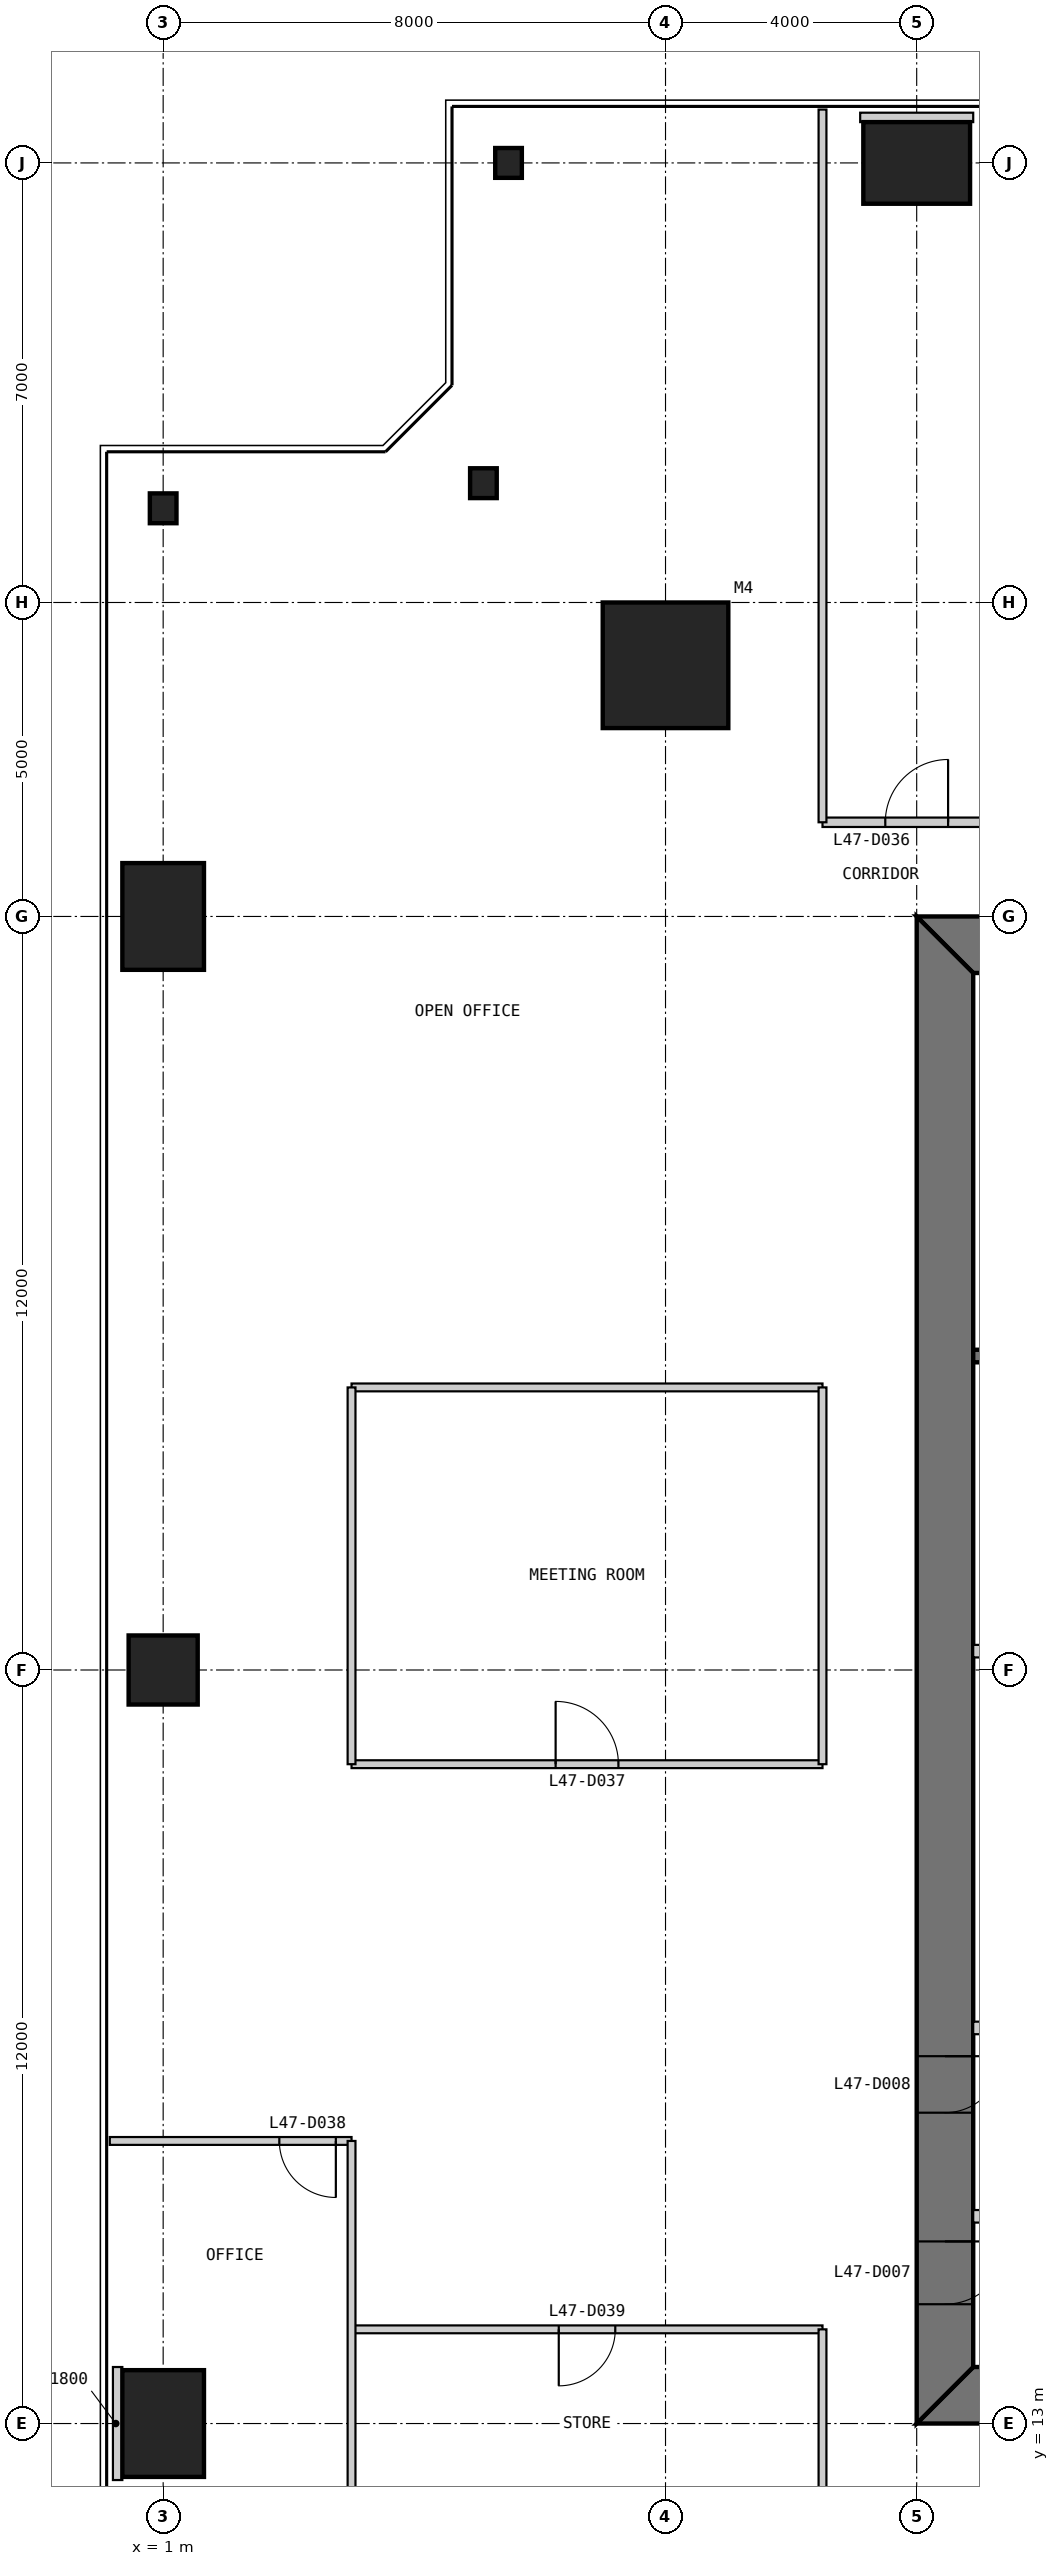
"""IFC4 building model, lengths in metres.
Left out: names, types, materials, properties, quantities, classifications, styles, units other than length and angle.
Written with IfcOpenShell. Run it as: python <this file> out.ifc"""

import sys

from ifc_helpers import new_model, si_unit, direction, frame, frame_2d, origin, origin_2d, place, context, subcontext, project, spatial, polyline, rectangle, i_section, outline, extrude, element, fill, save


model = new_model("IFC4")
c1 = context("Model", 3, precision=1e-05, world=origin(), true_north=direction((0.0, 1.0)))
c2 = subcontext(c1, "Body", "Model", "MODEL_VIEW")
j1 = project(units=[si_unit("LENGTHUNIT", "METRE"), si_unit("PLANEANGLEUNIT", "RADIAN")], contexts=[c1])
p1 = place(None, origin())
s1 = spatial("IfcSite", under=j1, at=p1, CompositionType="ELEMENT")
p2 = place(p1, origin())
s2 = spatial("IfcBuilding", under=s1, at=p2, CompositionType="ELEMENT")
p3 = place(p2, frame((0.0, 0.0, 201.8)))
s3 = spatial("IfcBuildingStorey", under=s2, at=p3, CompositionType="ELEMENT", Elevation=201.8)
p4 = place(p3, frame((9.0, 41.0, 0.0), z_axis=(0.0, 0.0, 1.0), x_axis=(1.0, 0.0, 0.0)))
e1 = element("IfcColumn", 1, at=p4, inside=s3, PredefinedType="COLUMN", context=c2, shape_type="SweptSolid", body=[
    extrude(rectangle(XDim=2.0, YDim=2.0, at=origin_2d()), origin(), (0.0, 0.0, 1.0), 4.0),
])
p5 = place(p3, frame((13.0, 49.0, 0.0), z_axis=(0.0, 0.0, 1.0), x_axis=(1.0, 0.0, 0.0)))
e2 = element("IfcColumn", 2, at=p5, inside=s3, PredefinedType="COLUMN", context=c2, shape_type="SweptSolid", body=[
    extrude(rectangle(XDim=1.7, YDim=1.3, at=origin_2d()), origin(), (0.0, 0.0, 1.0), 4.0),
])
for number, where, z_axis, x_axis in (
    (3, (6.5, 49.0, 0.0), (0.0, 0.0, 1.0), (1.0, 0.0, 0.0)),
    (4, (6.1, 43.9, 0.0), (0.0, 0.0, 1.0), (1.0, 0.0, 0.0)),
    (5, (1.0, 43.5, 0.0), (0.0, 0.0, 1.0), (1.0, 0.0, 0.0)),
):
    element("IfcColumn", number, at=place(p3, frame(where, z_axis=z_axis, x_axis=x_axis)), inside=s3, PredefinedType="COLUMN", context=c2, shape_type="SweptSolid", body=[
        extrude(i_section(OverallWidth=0.424, OverallDepth=0.475, WebThickness=0.048, FlangeThickness=0.077, at=origin_2d()), origin(), (0.0, 0.0, 1.0), 4.0),
    ])
p6 = place(p3, frame((1.0, 37.0, 0.0), z_axis=(0.0, 0.0, 1.0), x_axis=(1.0, 0.0, 0.0)))
e6 = element("IfcColumn", 6, at=p6, inside=s3, PredefinedType="COLUMN", context=c2, shape_type="SweptSolid", body=[
    extrude(rectangle(XDim=1.3, YDim=1.7, at=origin_2d()), origin(), (0.0, 0.0, 1.0), 4.0),
])
p7 = place(p3, frame((1.0, 25.0, 0.0), z_axis=(0.0, 0.0, 1.0), x_axis=(1.0, 0.0, 0.0)))
e7 = element("IfcColumn", 7, at=p7, inside=s3, PredefinedType="COLUMN", context=c2, shape_type="SweptSolid", body=[
    extrude(rectangle(XDim=1.1, YDim=1.1, at=origin_2d()), origin(), (0.0, 0.0, 1.0), 4.0),
])
p8 = place(p3, frame((1.0, 13.0, 0.0), z_axis=(0.0, 0.0, 1.0), x_axis=(1.0, 0.0, 0.0)))
e8 = element("IfcColumn", 8, at=p8, inside=s3, PredefinedType="COLUMN", context=c2, shape_type="SweptSolid", body=[
    extrude(rectangle(XDim=1.3, YDim=1.7, at=origin_2d()), origin(), (0.0, 0.0, 1.0), 4.0),
])
p9 = place(p3, frame((13.0, 13.45, 0.0), z_axis=(0.0, 0.0, 1.0), x_axis=(1.0, 0.0, 0.0)))
e9 = element("IfcWall", 9, at=p9, inside=s3, PredefinedType="SHEAR", context=c2, shape_type="SweptSolid", body=[
    extrude(outline(polyline([(0.0, -0.45), (24.0, -0.45), (23.1, 0.45), (0.9, 0.45), (0.0, -0.45)])), origin(), (0.0, 0.0, 1.0), 4.0),
])
p10 = place(p9, frame((4.9, 0.0, 0.0)))
e10 = element("IfcOpeningElement", 10, at=p10, cuts=e9, PredefinedType="OPENING", context=c2, shape_type="SweptSolid", body=[
    extrude(rectangle(XDim=1.0, YDim=2.2, at=frame_2d((0.5, 1.1))), frame((0.0, 0.46, 0.0), z_axis=(0.0, -1.0, 0.0), x_axis=(1.0, 0.0, 0.0)), (0.0, 0.0, 1.0), 0.92),
])
p11 = place(p9, frame((8.9, 0.0, 0.0)))
e11 = element("IfcOpeningElement", 11, at=p11, cuts=e9, PredefinedType="OPENING", context=c2, shape_type="SweptSolid", body=[
    extrude(rectangle(XDim=1.1, YDim=2.2, at=frame_2d((0.55, 1.1))), frame((0.0, 0.46, 0.0), z_axis=(0.0, -1.0, 0.0), x_axis=(1.0, 0.0, 0.0)), (0.0, 0.0, 1.0), 0.92),
])
p12 = place(p9, frame((15.05, 0.0, 0.0)))
e12 = element("IfcOpeningElement", 12, at=p12, cuts=e9, PredefinedType="OPENING", context=c2, shape_type="SweptSolid", body=[
    extrude(rectangle(XDim=0.9, YDim=2.2, at=frame_2d((0.45, 1.1))), frame((0.0, 0.46, 0.0), z_axis=(0.0, -1.0, 0.0), x_axis=(1.0, 0.0, 0.0)), (0.0, 0.0, 1.0), 0.92),
])
p13 = place(p9, frame((17.9, 0.0, 0.0)))
e13 = element("IfcOpeningElement", 13, at=p13, cuts=e9, PredefinedType="OPENING", context=c2, shape_type="SweptSolid", body=[
    extrude(rectangle(XDim=1.0, YDim=2.2, at=frame_2d((0.5, 1.1))), frame((0.0, 0.46, 0.0), z_axis=(0.0, -1.0, 0.0), x_axis=(1.0, 0.0, 0.0)), (0.0, 0.0, 1.0), 0.92),
])
p14 = place(p9, frame((21.4, 0.0, 0.0)))
e14 = element("IfcOpeningElement", 14, at=p14, cuts=e9, PredefinedType="OPENING", context=c2, shape_type="SweptSolid", body=[
    extrude(rectangle(XDim=1.0, YDim=2.2, at=frame_2d((0.5, 1.1))), frame((0.0, 0.46, 0.0), z_axis=(0.0, -1.0, 0.0), x_axis=(1.0, 0.0, 0.0)), (0.0, 0.0, 1.0), 0.92),
])
p15 = place(p3, frame((37.0, 36.55, 0.0), z_axis=(0.0, 0.0, 1.0), x_axis=(-1.0, 0.0, 0.0)))
e15 = element("IfcWall", 15, at=p15, inside=s3, PredefinedType="SHEAR", context=c2, shape_type="SweptSolid", body=[
    extrude(outline(polyline([(0.0, -0.45), (24.0, -0.45), (23.1, 0.45), (0.9, 0.45), (0.0, -0.45)])), origin(), (0.0, 0.0, 1.0), 4.0),
])
p16 = place(p15, frame((4.9, 0.0, 0.0)))
e16 = element("IfcOpeningElement", 16, at=p16, cuts=e15, PredefinedType="OPENING", context=c2, shape_type="SweptSolid", body=[
    extrude(rectangle(XDim=1.0, YDim=2.2, at=frame_2d((0.5, 1.1))), frame((0.0, 0.46, 0.0), z_axis=(0.0, -1.0, 0.0), x_axis=(1.0, 0.0, 0.0)), (0.0, 0.0, 1.0), 0.92),
])
p17 = place(p15, frame((8.9, 0.0, 0.0)))
e17 = element("IfcOpeningElement", 17, at=p17, cuts=e15, PredefinedType="OPENING", context=c2, shape_type="SweptSolid", body=[
    extrude(rectangle(XDim=1.1, YDim=2.2, at=frame_2d((0.55, 1.1))), frame((0.0, 0.46, 0.0), z_axis=(0.0, -1.0, 0.0), x_axis=(1.0, 0.0, 0.0)), (0.0, 0.0, 1.0), 0.92),
])
p18 = place(p15, frame((15.05, 0.0, 0.0)))
e18 = element("IfcOpeningElement", 18, at=p18, cuts=e15, PredefinedType="OPENING", context=c2, shape_type="SweptSolid", body=[
    extrude(rectangle(XDim=0.9, YDim=2.2, at=frame_2d((0.45, 1.1))), frame((0.0, 0.46, 0.0), z_axis=(0.0, -1.0, 0.0), x_axis=(1.0, 0.0, 0.0)), (0.0, 0.0, 1.0), 0.92),
])
p19 = place(p15, frame((17.9, 0.0, 0.0)))
e19 = element("IfcOpeningElement", 19, at=p19, cuts=e15, PredefinedType="OPENING", context=c2, shape_type="SweptSolid", body=[
    extrude(rectangle(XDim=1.0, YDim=2.2, at=frame_2d((0.5, 1.1))), frame((0.0, 0.46, 0.0), z_axis=(0.0, -1.0, 0.0), x_axis=(1.0, 0.0, 0.0)), (0.0, 0.0, 1.0), 0.92),
])
p20 = place(p15, frame((21.4, 0.0, 0.0)))
e20 = element("IfcOpeningElement", 20, at=p20, cuts=e15, PredefinedType="OPENING", context=c2, shape_type="SweptSolid", body=[
    extrude(rectangle(XDim=1.0, YDim=2.2, at=frame_2d((0.5, 1.1))), frame((0.0, 0.46, 0.0), z_axis=(0.0, -1.0, 0.0), x_axis=(1.0, 0.0, 0.0)), (0.0, 0.0, 1.0), 0.92),
])
p21 = place(p3, frame((13.45, 36.1, 0.0), z_axis=(0.0, 0.0, 1.0), x_axis=(0.0, -1.0, 0.0)))
e21 = element("IfcWall", 21, at=p21, inside=s3, PredefinedType="SHEAR", context=c2, shape_type="SweptSolid", body=[
    extrude(outline(polyline([(-0.9, -0.45), (23.1, -0.45), (22.2, 0.45), (0.0, 0.45), (-0.9, -0.45)])), origin(), (0.0, 0.0, 1.0), 4.0),
])
p22 = place(p21, frame((20.2, 0.0, 0.0)))
e22 = element("IfcOpeningElement", 22, at=p22, cuts=e21, PredefinedType="OPENING", context=c2, shape_type="SweptSolid", body=[
    extrude(rectangle(XDim=1.0, YDim=2.2, at=frame_2d((0.5, 1.1))), frame((0.0, 0.46, 0.0), z_axis=(0.0, -1.0, 0.0), x_axis=(1.0, 0.0, 0.0)), (0.0, 0.0, 1.0), 0.92),
])
p23 = place(p21, frame((17.25, 0.0, 0.0)))
e23 = element("IfcOpeningElement", 23, at=p23, cuts=e21, PredefinedType="OPENING", context=c2, shape_type="SweptSolid", body=[
    extrude(rectangle(XDim=0.9, YDim=2.2, at=frame_2d((0.45, 1.1))), frame((0.0, 0.46, 0.0), z_axis=(0.0, -1.0, 0.0), x_axis=(1.0, 0.0, 0.0)), (0.0, 0.0, 1.0), 0.92),
])
for number, where, z_axis, x_axis in (
    (24, (13.9, 16.3, 0.0), (0.0, 0.0, 1.0), (1.0, 0.0, 0.0)),
    (25, (13.9, 19.3, 0.0), (0.0, 0.0, 1.0), (1.0, 0.0, 0.0)),
    (26, (13.9, 25.3, 0.0), (0.0, 0.0, 1.0), (1.0, 0.0, 0.0)),
):
    element("IfcWall", number, at=place(p3, frame(where, z_axis=z_axis, x_axis=x_axis)), inside=s3, PredefinedType="PARTITIONING", context=c2, shape_type="SweptSolid", body=[
        extrude(rectangle(XDim=2.8, YDim=0.2, at=frame_2d((1.4, 0.0))), origin(), (0.0, 0.0, 1.0), 3.8),
    ])
p24 = place(p3, frame((29.7, 30.0, 0.0), z_axis=(0.0, 0.0, 1.0), x_axis=(-1.0, 0.0, 0.0)))
e27 = element("IfcWall", 27, at=p24, inside=s3, PredefinedType="SOLIDWALL", context=c2, shape_type="SweptSolid", body=[
    extrude(rectangle(XDim=15.8, YDim=0.2, at=frame_2d((7.9, 0.0))), origin(), (0.0, 0.0, 1.0), 3.8),
])
p25 = place(p3, frame((38.5, 38.5, 0.0), z_axis=(0.0, 0.0, 1.0), x_axis=(-1.0, 0.0, 0.0)))
e28 = element("IfcWall", 28, at=p25, inside=s3, PredefinedType="PARTITIONING", context=c2, shape_type="SweptSolid", body=[
    extrude(rectangle(XDim=27.0, YDim=0.15, at=frame_2d((13.5, 0.0))), origin(), (0.0, 0.0, 1.0), 3.85),
])
p26 = place(p25, frame((13.0, 0.0, 0.0)))
e29 = element("IfcOpeningElement", 29, at=p26, cuts=e28, PredefinedType="OPENING", context=c2, shape_type="SweptSolid", body=[
    extrude(rectangle(XDim=1.0, YDim=2.2, at=frame_2d((0.5, 1.1))), frame((0.0, 0.085, 0.0), z_axis=(0.0, -1.0, 0.0), x_axis=(1.0, 0.0, 0.0)), (0.0, 0.0, 1.0), 0.17),
])
p27 = place(p25, frame((4.0, 0.0, 0.0)))
e30 = element("IfcOpeningElement", 30, at=p27, cuts=e28, PredefinedType="OPENING", context=c2, shape_type="SweptSolid", body=[
    extrude(rectangle(XDim=1.0, YDim=2.2, at=frame_2d((0.5, 1.1))), frame((0.0, 0.085, 0.0), z_axis=(0.0, -1.0, 0.0), x_axis=(1.0, 0.0, 0.0)), (0.0, 0.0, 1.0), 0.17),
])
p28 = place(p25, frame((22.0, 0.0, 0.0)))
e31 = element("IfcOpeningElement", 31, at=p28, cuts=e28, PredefinedType="OPENING", context=c2, shape_type="SweptSolid", body=[
    extrude(rectangle(XDim=1.0, YDim=2.2, at=frame_2d((0.5, 1.1))), frame((0.0, 0.085, 0.0), z_axis=(0.0, -1.0, 0.0), x_axis=(1.0, 0.0, 0.0)), (0.0, 0.0, 1.0), 0.17),
])
p29 = place(p25, frame((25.0, 0.0, 0.0)))
e32 = element("IfcOpeningElement", 32, at=p29, cuts=e28, PredefinedType="OPENING", context=c2, shape_type="SweptSolid", body=[
    extrude(rectangle(XDim=1.0, YDim=2.2, at=frame_2d((0.5, 1.1))), frame((0.0, 0.085, 0.0), z_axis=(0.0, -1.0, 0.0), x_axis=(1.0, 0.0, 0.0)), (0.0, 0.0, 1.0), 0.17),
])
p30 = place(p3, frame((11.5, 49.85, 0.0), z_axis=(0.0, 0.0, 1.0), x_axis=(0.0, -1.0, 0.0)))
e33 = element("IfcWall", 33, at=p30, inside=s3, PredefinedType="PARTITIONING", context=c2, shape_type="SweptSolid", body=[
    extrude(rectangle(XDim=11.35, YDim=0.125, at=frame_2d((5.675, 0.0))), origin(), (0.0, 0.0, 1.0), 3.85),
])
p31 = place(p3, frame((4.0, 29.5, 0.0), z_axis=(0.0, 0.0, 1.0), x_axis=(1.0, 0.0, 0.0)))
e34 = element("IfcWall", 34, at=p31, inside=s3, PredefinedType="PARTITIONING", context=c2, shape_type="SweptSolid", body=[
    extrude(rectangle(XDim=7.5, YDim=0.125, at=frame_2d((3.75, 0.0))), origin(), (0.0, 0.0, 1.0), 3.85),
])
p32 = place(p3, frame((4.0, 23.5, 0.0), z_axis=(0.0, 0.0, 1.0), x_axis=(1.0, 0.0, 0.0)))
e35 = element("IfcWall", 35, at=p32, inside=s3, PredefinedType="PARTITIONING", context=c2, shape_type="SweptSolid", body=[
    extrude(rectangle(XDim=7.5, YDim=0.125, at=frame_2d((3.75, 0.0))), origin(), (0.0, 0.0, 1.0), 3.85),
])
p33 = place(p32, frame((3.25, 0.0, 0.0)))
e36 = element("IfcOpeningElement", 36, at=p33, cuts=e35, PredefinedType="OPENING", context=c2, shape_type="SweptSolid", body=[
    extrude(rectangle(XDim=1.0, YDim=2.2, at=frame_2d((0.5, 1.1))), frame((0.0, 0.073, 0.0), z_axis=(0.0, -1.0, 0.0), x_axis=(1.0, 0.0, 0.0)), (0.0, 0.0, 1.0), 0.145),
])
p34 = place(p3, frame((0.15, 17.5, 0.0), z_axis=(0.0, 0.0, 1.0), x_axis=(1.0, 0.0, 0.0)))
e37 = element("IfcWall", 37, at=p34, inside=s3, PredefinedType="PARTITIONING", context=c2, shape_type="SweptSolid", body=[
    extrude(rectangle(XDim=3.85, YDim=0.125, at=frame_2d((1.925, 0.0))), origin(), (0.0, 0.0, 1.0), 3.85),
])
p35 = place(p34, frame((2.7, 0.0, 0.0)))
e38 = element("IfcOpeningElement", 38, at=p35, cuts=e37, PredefinedType="OPENING", context=c2, shape_type="SweptSolid", body=[
    extrude(rectangle(XDim=0.9, YDim=2.2, at=frame_2d((0.45, 1.1))), frame((0.0, 0.073, 0.0), z_axis=(0.0, -1.0, 0.0), x_axis=(1.0, 0.0, 0.0)), (0.0, 0.0, 1.0), 0.145),
])
p36 = place(p3, frame((4.0, 14.5, 0.0), z_axis=(0.0, 0.0, 1.0), x_axis=(1.0, 0.0, 0.0)))
e39 = element("IfcWall", 39, at=p36, inside=s3, PredefinedType="PARTITIONING", context=c2, shape_type="SweptSolid", body=[
    extrude(rectangle(XDim=7.5, YDim=0.125, at=frame_2d((3.75, 0.0))), origin(), (0.0, 0.0, 1.0), 3.85),
])
p37 = place(p36, frame((3.3, 0.0, 0.0)))
e40 = element("IfcOpeningElement", 40, at=p37, cuts=e39, PredefinedType="OPENING", context=c2, shape_type="SweptSolid", body=[
    extrude(rectangle(XDim=0.9, YDim=2.2, at=frame_2d((0.45, 1.1))), frame((0.0, 0.073, 0.0), z_axis=(0.0, -1.0, 0.0), x_axis=(1.0, 0.0, 0.0)), (0.0, 0.0, 1.0), 0.145),
])
for number, where, z_axis, x_axis in (
    (41, (4.0, 29.5, 0.0), (0.0, 0.0, 1.0), (0.0, -1.0, 0.0)),
    (42, (4.0, 17.5, 0.0), (0.0, 0.0, 1.0), (0.0, -1.0, 0.0)),
):
    element("IfcWall", number, at=place(p3, frame(where, z_axis=z_axis, x_axis=x_axis)), inside=s3, PredefinedType="PARTITIONING", context=c2, shape_type="SweptSolid", body=[
        extrude(rectangle(XDim=6.0, YDim=0.125, at=frame_2d((3.0, 0.0))), origin(), (0.0, 0.0, 1.0), 3.238),
    ])
p38 = place(p3, frame((11.5, 29.5, 0.0), z_axis=(0.0, 0.0, 1.0), x_axis=(0.0, -1.0, 0.0)))
e43 = element("IfcWall", 43, at=p38, inside=s3, PredefinedType="PARTITIONING", context=c2, shape_type="SweptSolid", body=[
    extrude(rectangle(XDim=6.0, YDim=0.125, at=frame_2d((3.0, 0.0))), origin(), (0.0, 0.0, 1.0), 3.85),
])
p39 = place(p3, frame((11.5, 14.5, 0.0), z_axis=(0.0, 0.0, 1.0), x_axis=(0.0, -1.0, 0.0)))
e44 = element("IfcWall", 44, at=p39, inside=s3, PredefinedType="PARTITIONING", context=c2, shape_type="SweptSolid", body=[
    extrude(rectangle(XDim=3.0, YDim=0.125, at=frame_2d((1.5, 0.0))), origin(), (0.0, 0.0, 1.0), 3.85),
])
for number, where, z_axis, x_axis in (
    (45, (13.0, 49.8, 0.0), (0.0, 0.0, 1.0), (0.0, -1.0, 0.0)),
    (46, (0.2, 13.0, 0.0), (0.0, 0.0, 1.0), (1.0, 0.0, 0.0)),
):
    element("IfcWall", number, at=place(p3, frame(where, z_axis=z_axis, x_axis=x_axis)), inside=s3, PredefinedType="PARTITIONING", context=c2, shape_type="SweptSolid", body=[
        extrude(rectangle(XDim=0.15, YDim=1.8, at=frame_2d((0.075, 0.0))), origin(), (0.0, 0.0, 1.0), 3.85),
    ])
p40 = place(p22, origin())
e47 = element("IfcDoor", 47, at=p40, inside=s3, OperationType="SINGLE_SWING_LEFT", PredefinedType="DOOR", context=c2, shape_type="SweptSolid", body=[
    extrude(rectangle(XDim=1.0, YDim=2.2, at=frame_2d((0.5, 1.1))), frame((0.0, 0.025, 0.0), z_axis=(0.0, -1.0, 0.0), x_axis=(1.0, 0.0, 0.0)), (0.0, 0.0, 1.0), 0.05),
    extrude(outline(polyline([(0.0, 0.0), (0.04, 0.0), (0.04, 2.16), (0.96, 2.16), (0.96, 0.0), (1.0, 0.0), (1.0, 2.2), (0.0, 2.2), (0.0, 0.0)])), frame((0.0, 0.3, 0.0), z_axis=(0.0, -1.0, 0.0), x_axis=(1.0, 0.0, 0.0)), (0.0, 0.0, 1.0), 0.6),
])
fill(e22, e47)
p41 = place(p23, origin())
e48 = element("IfcDoor", 48, at=p41, inside=s3, OperationType="SINGLE_SWING_LEFT", PredefinedType="DOOR", context=c2, shape_type="SweptSolid", body=[
    extrude(rectangle(XDim=0.9, YDim=2.2, at=frame_2d((0.45, 1.1))), frame((0.0, 0.025, 0.0), z_axis=(0.0, -1.0, 0.0), x_axis=(1.0, 0.0, 0.0)), (0.0, 0.0, 1.0), 0.05),
    extrude(outline(polyline([(0.0, 0.0), (0.04, 0.0), (0.04, 2.16), (0.86, 2.16), (0.86, 0.0), (0.9, 0.0), (0.9, 2.2), (0.0, 2.2), (0.0, 0.0)])), frame((0.0, 0.3, 0.0), z_axis=(0.0, -1.0, 0.0), x_axis=(1.0, 0.0, 0.0)), (0.0, 0.0, 1.0), 0.6),
])
fill(e23, e48)
p42 = place(p29, frame((1.0, 0.0, 0.0), z_axis=(0.0, 0.0, 1.0), x_axis=(-1.0, 0.0, 0.0)))
e49 = element("IfcDoor", 49, at=p42, inside=s3, OperationType="SINGLE_SWING_RIGHT", PredefinedType="DOOR", context=c2, shape_type="SweptSolid", body=[
    extrude(rectangle(XDim=1.0, YDim=2.2, at=frame_2d((0.5, 1.1))), frame((0.0, 0.025, 0.0), z_axis=(0.0, -1.0, 0.0), x_axis=(1.0, 0.0, 0.0)), (0.0, 0.0, 1.0), 0.05),
])
fill(e32, e49)
p43 = place(p33, origin())
e50 = element("IfcDoor", 50, at=p43, inside=s3, OperationType="SINGLE_SWING_LEFT", PredefinedType="DOOR", context=c2, shape_type="SweptSolid", body=[
    extrude(rectangle(XDim=1.0, YDim=2.2, at=frame_2d((0.5, 1.1))), frame((0.0, 0.025, 0.0), z_axis=(0.0, -1.0, 0.0), x_axis=(1.0, 0.0, 0.0)), (0.0, 0.0, 1.0), 0.05),
])
fill(e36, e50)
p44 = place(p35, frame((0.9, 0.0, 0.0), z_axis=(0.0, 0.0, 1.0), x_axis=(-1.0, 0.0, 0.0)))
e51 = element("IfcDoor", 51, at=p44, inside=s3, OperationType="SINGLE_SWING_LEFT", PredefinedType="DOOR", context=c2, shape_type="SweptSolid", body=[
    extrude(rectangle(XDim=0.9, YDim=2.2, at=frame_2d((0.45, 1.1))), frame((0.0, 0.025, 0.0), z_axis=(0.0, -1.0, 0.0), x_axis=(1.0, 0.0, 0.0)), (0.0, 0.0, 1.0), 0.05),
])
fill(e38, e51)
p45 = place(p37, frame((0.9, 0.0, 0.0), z_axis=(0.0, 0.0, 1.0), x_axis=(-1.0, 0.0, 0.0)))
e52 = element("IfcDoor", 52, at=p45, inside=s3, OperationType="SINGLE_SWING_RIGHT", PredefinedType="DOOR", context=c2, shape_type="SweptSolid", body=[
    extrude(rectangle(XDim=0.9, YDim=2.2, at=frame_2d((0.45, 1.1))), frame((0.0, 0.025, 0.0), z_axis=(0.0, -1.0, 0.0), x_axis=(1.0, 0.0, 0.0)), (0.0, 0.0, 1.0), 0.05),
])
fill(e40, e52)
save(model, sys.argv[1])
